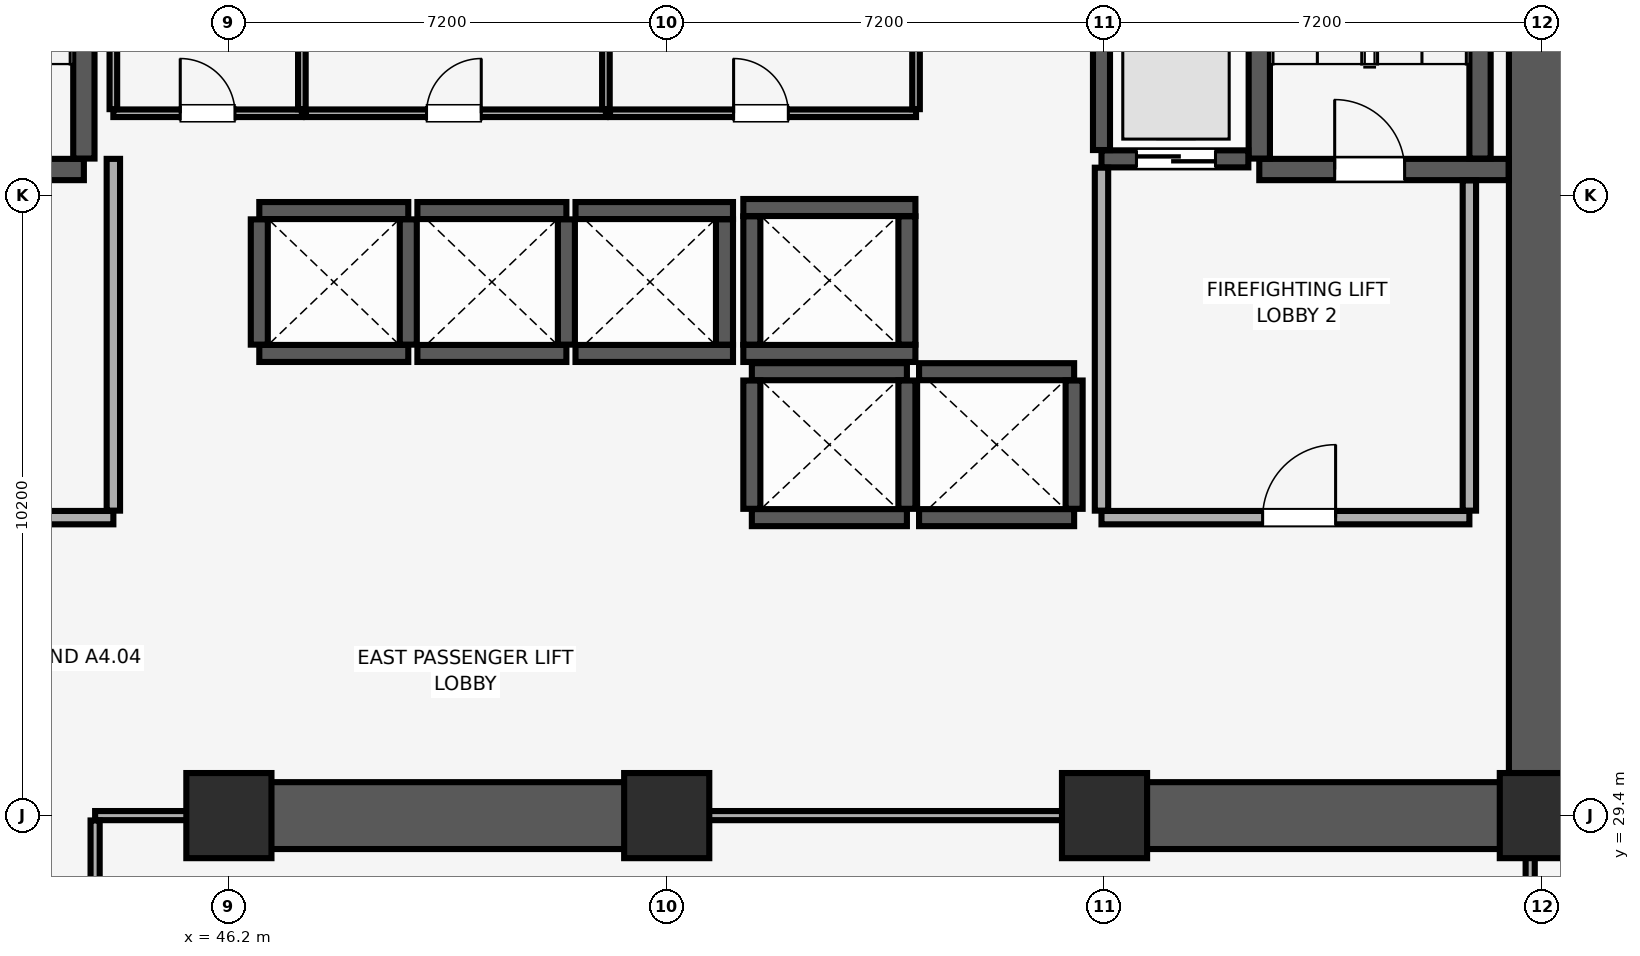
"""IFC4 building model, lengths in metres.
Left out: names, types, materials, properties, quantities, classifications, styles, units other than length and angle.
Written with IfcOpenShell. Run it as: python <this file> out.ifc"""

import sys

from ifc_helpers import new_model, si_unit, direction, frame, frame_2d, origin, origin_2d, place, context, subcontext, project, spatial, rectangle, extrude, element, fill, save


model = new_model("IFC4")
c1 = context("Model", 3, precision=1e-05, world=origin(), true_north=direction((0.0, 1.0)))
c2 = subcontext(c1, "Body", "Model", "MODEL_VIEW")
j1 = project(units=[si_unit("LENGTHUNIT", "METRE"), si_unit("PLANEANGLEUNIT", "RADIAN")], contexts=[c1])
p1 = place(None, origin())
s1 = spatial("IfcSite", under=j1, at=p1, CompositionType="ELEMENT")
p2 = place(p1, origin())
s2 = spatial("IfcBuilding", under=s1, at=p2, CompositionType="ELEMENT")
p3 = place(p2, frame((0.0, 0.0, 26.0)))
s3 = spatial("IfcBuildingStorey", under=s2, at=p3, CompositionType="ELEMENT", Elevation=26.0)
for number, where, z_axis, x_axis in (
    (1, (46.2, 29.4, 0.0), (0.0, 0.0, 1.0), (1.0, 0.0, 0.0)),
    (2, (53.4, 29.4, 0.0), (0.0, 0.0, 1.0), (1.0, 0.0, 0.0)),
    (3, (60.6, 29.4, 0.0), (0.0, 0.0, 1.0), (1.0, 0.0, 0.0)),
    (4, (67.8, 29.4, 0.0), (0.0, 0.0, 1.0), (1.0, 0.0, 0.0)),
):
    element("IfcColumn", number, at=place(p3, frame(where, z_axis=z_axis, x_axis=x_axis)), inside=s3, PredefinedType="COLUMN", context=c2, shape_type="SweptSolid", body=[
        extrude(rectangle(XDim=1.4, YDim=1.4, at=origin_2d()), origin(), (0.0, 0.0, 1.0), 5.16),
    ])
p4 = place(p3, frame((67.8, 29.4, 0.0), z_axis=(0.0, 0.0, 1.0), x_axis=(0.0, 1.0, 0.0)))
e5 = element("IfcWall", 5, at=p4, inside=s3, PredefinedType="SHEAR", context=c2, shape_type="SweptSolid", body=[
    extrude(rectangle(XDim=19.2, YDim=1.1, at=frame_2d((9.6, 0.0))), origin(), (0.0, 0.0, 1.0), 5.12),
])
p5 = place(p3, frame((46.0, 29.4, 0.0), z_axis=(0.0, 0.0, 1.0), x_axis=(1.0, 0.0, 0.0)))
e6 = element("IfcWall", 6, at=p5, inside=s3, PredefinedType="SHEAR", context=c2, shape_type="SweptSolid", body=[
    extrude(rectangle(XDim=7.6, YDim=1.1, at=frame_2d((3.8, 0.0))), origin(), (0.0, 0.0, 1.0), 5.12),
])
p6 = place(p3, frame((60.4, 29.4, 0.0), z_axis=(0.0, 0.0, 1.0), x_axis=(1.0, 0.0, 0.0)))
e7 = element("IfcWall", 7, at=p6, inside=s3, PredefinedType="SHEAR", context=c2, shape_type="SweptSolid", body=[
    extrude(rectangle(XDim=6.845, YDim=1.1, at=frame_2d((3.423, 0.0))), origin(), (0.0, 0.0, 1.0), 5.12),
])
p7 = place(p3, frame((40.185, 40.025, 0.0), z_axis=(0.0, 0.0, 1.0), x_axis=(1.0, 0.0, 0.0)))
e8 = element("IfcWall", 8, at=p7, inside=s3, PredefinedType="SHEAR", context=c2, shape_type="SweptSolid", body=[
    extrude(rectangle(XDim=3.63, YDim=0.35, at=frame_2d((1.815, 0.0))), origin(), (0.0, 0.0, 1.0), 5.12),
])
p8 = place(p7, frame((1.24, 0.0, 0.0)))
e9 = element("IfcOpeningElement", 9, at=p8, cuts=e8, PredefinedType="OPENING", context=c2, shape_type="SweptSolid", body=[
    extrude(rectangle(XDim=1.15, YDim=2.15, at=frame_2d((0.575, 1.075))), frame((0.0, 0.185, 0.0), z_axis=(0.0, -1.0, 0.0), x_axis=(1.0, 0.0, 0.0)), (0.0, 0.0, 1.0), 0.37),
])
p9 = place(p3, frame((43.815, 40.205, 0.0), z_axis=(0.0, 0.0, 1.0), x_axis=(0.0, 1.0, 0.0)))
e10 = element("IfcWall", 10, at=p9, inside=s3, PredefinedType="SHEAR", context=c2, shape_type="SweptSolid", body=[
    extrude(rectangle(XDim=8.09, YDim=0.35, at=frame_2d((4.045, 0.0))), origin(), (0.0, 0.0, 1.0), 5.12),
])
p10 = place(p3, frame((63.145, 40.025, 0.0), z_axis=(0.0, 0.0, 1.0), x_axis=(1.0, 0.0, 0.0)))
e11 = element("IfcWall", 11, at=p10, inside=s3, PredefinedType="SHEAR", context=c2, shape_type="SweptSolid", body=[
    extrude(rectangle(XDim=4.1, YDim=0.35, at=frame_2d((2.05, 0.0))), origin(), (0.0, 0.0, 1.0), 5.12),
])
p11 = place(p10, frame((1.24, 0.0, 0.0)))
e12 = element("IfcOpeningElement", 12, at=p11, cuts=e11, PredefinedType="OPENING", context=c2, shape_type="SweptSolid", body=[
    extrude(rectangle(XDim=1.15, YDim=2.15, at=frame_2d((0.575, 1.075))), frame((0.0, 0.185, 0.0), z_axis=(0.0, -1.0, 0.0), x_axis=(1.0, 0.0, 0.0)), (0.0, 0.0, 1.0), 0.37),
])
for number, where, z_axis, x_axis in (
    (13, (63.145, 40.205, 0.0), (0.0, 0.0, 1.0), (0.0, 1.0, 0.0)),
    (14, (66.775, 40.205, 0.0), (0.0, 0.0, 1.0), (0.0, 1.0, 0.0)),
):
    element("IfcWall", number, at=place(p3, frame(where, z_axis=z_axis, x_axis=x_axis)), inside=s3, PredefinedType="SHEAR", context=c2, shape_type="SweptSolid", body=[
        extrude(rectangle(XDim=8.09, YDim=0.35, at=frame_2d((4.045, 0.0))), origin(), (0.0, 0.0, 1.0), 5.12),
    ])
for number, where, z_axis, x_axis in (
    (15, (46.7, 37.0, 0.0), (0.0, 0.0, 1.0), (1.0, 0.0, 0.0)),
    (16, (46.7, 39.35, 0.0), (0.0, 0.0, 1.0), (1.0, 0.0, 0.0)),
):
    element("IfcWall", number, at=place(p3, frame(where, z_axis=z_axis, x_axis=x_axis)), inside=s3, PredefinedType="SHEAR", context=c2, shape_type="SweptSolid", body=[
        extrude(rectangle(XDim=2.45, YDim=0.28, at=frame_2d((1.225, 0.0))), origin(), (0.0, 0.0, 1.0), 5.12),
    ])
for number, where, z_axis, x_axis in (
    (17, (46.7, 37.145, 0.0), (0.0, 0.0, 1.0), (0.0, 1.0, 0.0)),
    (18, (49.15, 37.145, 0.0), (0.0, 0.0, 1.0), (0.0, 1.0, 0.0)),
):
    element("IfcWall", number, at=place(p3, frame(where, z_axis=z_axis, x_axis=x_axis)), inside=s3, PredefinedType="SHEAR", context=c2, shape_type="SweptSolid", body=[
        extrude(rectangle(XDim=2.06, YDim=0.28, at=frame_2d((1.03, 0.0))), origin(), (0.0, 0.0, 1.0), 5.12),
    ])
for number, where, z_axis, x_axis in (
    (19, (49.3, 37.0, 0.0), (0.0, 0.0, 1.0), (1.0, 0.0, 0.0)),
    (20, (49.3, 39.35, 0.0), (0.0, 0.0, 1.0), (1.0, 0.0, 0.0)),
):
    element("IfcWall", number, at=place(p3, frame(where, z_axis=z_axis, x_axis=x_axis)), inside=s3, PredefinedType="SHEAR", context=c2, shape_type="SweptSolid", body=[
        extrude(rectangle(XDim=2.45, YDim=0.28, at=frame_2d((1.225, 0.0))), origin(), (0.0, 0.0, 1.0), 5.12),
    ])
p12 = place(p3, frame((51.75, 37.145, 0.0), z_axis=(0.0, 0.0, 1.0), x_axis=(0.0, 1.0, 0.0)))
e21 = element("IfcWall", 21, at=p12, inside=s3, PredefinedType="SHEAR", context=c2, shape_type="SweptSolid", body=[
    extrude(rectangle(XDim=2.06, YDim=0.28, at=frame_2d((1.03, 0.0))), origin(), (0.0, 0.0, 1.0), 5.12),
])
for number, where, z_axis, x_axis in (
    (22, (51.9, 37.0, 0.0), (0.0, 0.0, 1.0), (1.0, 0.0, 0.0)),
    (23, (51.9, 39.35, 0.0), (0.0, 0.0, 1.0), (1.0, 0.0, 0.0)),
):
    element("IfcWall", number, at=place(p3, frame(where, z_axis=z_axis, x_axis=x_axis)), inside=s3, PredefinedType="SHEAR", context=c2, shape_type="SweptSolid", body=[
        extrude(rectangle(XDim=2.59, YDim=0.28, at=frame_2d((1.295, 0.0))), origin(), (0.0, 0.0, 1.0), 5.12),
    ])
p13 = place(p3, frame((54.35, 37.145, 0.0), z_axis=(0.0, 0.0, 1.0), x_axis=(0.0, 1.0, 0.0)))
e24 = element("IfcWall", 24, at=p13, inside=s3, PredefinedType="SHEAR", context=c2, shape_type="SweptSolid", body=[
    extrude(rectangle(XDim=2.06, YDim=0.28, at=frame_2d((1.03, 0.0))), origin(), (0.0, 0.0, 1.0), 5.12),
])
for number, where, z_axis, x_axis in (
    (25, (54.8, 34.3, 0.0), (0.0, 0.0, 1.0), (1.0, 0.0, 0.0)),
    (26, (54.8, 36.7, 0.0), (0.0, 0.0, 1.0), (1.0, 0.0, 0.0)),
):
    element("IfcWall", number, at=place(p3, frame(where, z_axis=z_axis, x_axis=x_axis)), inside=s3, PredefinedType="SHEAR", context=c2, shape_type="SweptSolid", body=[
        extrude(rectangle(XDim=2.55, YDim=0.28, at=frame_2d((1.275, 0.0))), origin(), (0.0, 0.0, 1.0), 5.12),
    ])
for number, where, z_axis, x_axis in (
    (27, (54.8, 34.445, 0.0), (0.0, 0.0, 1.0), (0.0, 1.0, 0.0)),
    (28, (57.35, 34.445, 0.0), (0.0, 0.0, 1.0), (0.0, 1.0, 0.0)),
):
    element("IfcWall", number, at=place(p3, frame(where, z_axis=z_axis, x_axis=x_axis)), inside=s3, PredefinedType="SHEAR", context=c2, shape_type="SweptSolid", body=[
        extrude(rectangle(XDim=2.11, YDim=0.28, at=frame_2d((1.055, 0.0))), origin(), (0.0, 0.0, 1.0), 5.12),
    ])
for number, where, z_axis, x_axis in (
    (29, (57.55, 34.3, 0.0), (0.0, 0.0, 1.0), (1.0, 0.0, 0.0)),
    (30, (57.55, 36.7, 0.0), (0.0, 0.0, 1.0), (1.0, 0.0, 0.0)),
):
    element("IfcWall", number, at=place(p3, frame(where, z_axis=z_axis, x_axis=x_axis)), inside=s3, PredefinedType="SHEAR", context=c2, shape_type="SweptSolid", body=[
        extrude(rectangle(XDim=2.55, YDim=0.28, at=frame_2d((1.275, 0.0))), origin(), (0.0, 0.0, 1.0), 5.12),
    ])
p14 = place(p3, frame((60.1, 34.445, 0.0), z_axis=(0.0, 0.0, 1.0), x_axis=(0.0, 1.0, 0.0)))
e31 = element("IfcWall", 31, at=p14, inside=s3, PredefinedType="SHEAR", context=c2, shape_type="SweptSolid", body=[
    extrude(rectangle(XDim=2.11, YDim=0.28, at=frame_2d((1.055, 0.0))), origin(), (0.0, 0.0, 1.0), 5.12),
])
for number, where, z_axis, x_axis in (
    (32, (54.66, 37.0, 0.0), (0.0, 0.0, 1.0), (1.0, 0.0, 0.0)),
    (33, (54.66, 39.4, 0.0), (0.0, 0.0, 1.0), (1.0, 0.0, 0.0)),
):
    element("IfcWall", number, at=place(p3, frame(where, z_axis=z_axis, x_axis=x_axis)), inside=s3, PredefinedType="SHEAR", context=c2, shape_type="SweptSolid", body=[
        extrude(rectangle(XDim=2.83, YDim=0.28, at=frame_2d((1.415, 0.0))), origin(), (0.0, 0.0, 1.0), 5.12),
    ])
for number, where, z_axis, x_axis in (
    (34, (54.8, 37.145, 0.0), (0.0, 0.0, 1.0), (0.0, 1.0, 0.0)),
    (35, (57.35, 37.145, 0.0), (0.0, 0.0, 1.0), (0.0, 1.0, 0.0)),
):
    element("IfcWall", number, at=place(p3, frame(where, z_axis=z_axis, x_axis=x_axis)), inside=s3, PredefinedType="SHEAR", context=c2, shape_type="SweptSolid", body=[
        extrude(rectangle(XDim=2.11, YDim=0.28, at=frame_2d((1.055, 0.0))), origin(), (0.0, 0.0, 1.0), 5.12),
    ])
p15 = place(p3, frame((60.55, 40.2, 0.0), z_axis=(0.0, 0.0, 1.0), x_axis=(1.0, 0.0, 0.0)))
e36 = element("IfcWall", 36, at=p15, inside=s3, PredefinedType="SHEAR", context=c2, shape_type="SweptSolid", body=[
    extrude(rectangle(XDim=2.415, YDim=0.28, at=frame_2d((1.208, 0.0))), origin(), (0.0, 0.0, 1.0), 5.12),
])
p16 = place(p15, frame((0.575, 0.0, 0.0)))
e37 = element("IfcOpeningElement", 37, at=p16, cuts=e36, PredefinedType="OPENING", context=c2, shape_type="SweptSolid", body=[
    extrude(rectangle(XDim=1.3, YDim=2.3, at=frame_2d((0.65, 1.15))), frame((0.0, 0.15, 0.0), z_axis=(0.0, -1.0, 0.0), x_axis=(1.0, 0.0, 0.0)), (0.0, 0.0, 1.0), 0.3),
])
p17 = place(p3, frame((60.55, 40.345, 0.0), z_axis=(0.0, 0.0, 1.0), x_axis=(0.0, 1.0, 0.0)))
e38 = element("IfcWall", 38, at=p17, inside=s3, PredefinedType="SHEAR", context=c2, shape_type="SweptSolid", body=[
    extrude(rectangle(XDim=2.81, YDim=0.28, at=frame_2d((1.405, 0.0))), origin(), (0.0, 0.0, 1.0), 5.12),
])
p18 = place(p3, frame((60.55, 34.3, 0.0), z_axis=(0.0, 0.0, 1.0), x_axis=(1.0, 0.0, 0.0)))
e39 = element("IfcWall", 39, at=p18, inside=s3, PredefinedType="PARTITIONING", context=c2, shape_type="SweptSolid", body=[
    extrude(rectangle(XDim=6.05, YDim=0.22, at=frame_2d((3.025, 0.0))), origin(), (0.0, 0.0, 1.0), 5.12),
])
p19 = place(p18, frame((2.65, 0.0, 0.0)))
e40 = element("IfcOpeningElement", 40, at=p19, cuts=e39, PredefinedType="OPENING", context=c2, shape_type="SweptSolid", body=[
    extrude(rectangle(XDim=1.2, YDim=2.15, at=frame_2d((0.6, 1.075))), frame((0.0, 0.12, 0.0), z_axis=(0.0, -1.0, 0.0), x_axis=(1.0, 0.0, 0.0)), (0.0, 0.0, 1.0), 0.24),
])
p20 = place(p3, frame((60.55, 34.415, 0.0), z_axis=(0.0, 0.0, 1.0), x_axis=(0.0, 1.0, 0.0)))
e41 = element("IfcWall", 41, at=p20, inside=s3, PredefinedType="PARTITIONING", context=c2, shape_type="SweptSolid", body=[
    extrude(rectangle(XDim=5.64, YDim=0.22, at=frame_2d((2.82, 0.0))), origin(), (0.0, 0.0, 1.0), 5.12),
])
p21 = place(p3, frame((66.6, 34.415, 0.0), z_axis=(0.0, 0.0, 1.0), x_axis=(0.0, 1.0, 0.0)))
e42 = element("IfcWall", 42, at=p21, inside=s3, PredefinedType="PARTITIONING", context=c2, shape_type="SweptSolid", body=[
    extrude(rectangle(XDim=5.43, YDim=0.22, at=frame_2d((2.715, 0.0))), origin(), (0.0, 0.0, 1.0), 5.12),
])
p22 = place(p3, frame((39.7, 34.3, 0.0), z_axis=(0.0, 0.0, 1.0), x_axis=(1.0, 0.0, 0.0)))
e43 = element("IfcWall", 43, at=p22, inside=s3, PredefinedType="PARTITIONING", context=c2, shape_type="SweptSolid", body=[
    extrude(rectangle(XDim=4.6, YDim=0.22, at=frame_2d((2.3, 0.0))), origin(), (0.0, 0.0, 1.0), 5.12),
])
p23 = place(p22, frame((1.7, 0.0, 0.0)))
e44 = element("IfcOpeningElement", 44, at=p23, cuts=e43, PredefinedType="OPENING", context=c2, shape_type="SweptSolid", body=[
    extrude(rectangle(XDim=1.2, YDim=2.15, at=frame_2d((0.6, 1.075))), frame((0.0, 0.12, 0.0), z_axis=(0.0, -1.0, 0.0), x_axis=(1.0, 0.0, 0.0)), (0.0, 0.0, 1.0), 0.24),
])
p24 = place(p3, frame((44.3, 34.415, 0.0), z_axis=(0.0, 0.0, 1.0), x_axis=(0.0, 1.0, 0.0)))
e45 = element("IfcWall", 45, at=p24, inside=s3, PredefinedType="PARTITIONING", context=c2, shape_type="SweptSolid", body=[
    extrude(rectangle(XDim=5.785, YDim=0.22, at=frame_2d((2.893, 0.0))), origin(), (0.0, 0.0, 1.0), 5.12),
])
p25 = place(p3, frame((44.3, 40.95, 0.0), z_axis=(0.0, 0.0, 1.0), x_axis=(1.0, 0.0, 0.0)))
e46 = element("IfcWall", 46, at=p25, inside=s3, PredefinedType="PARTITIONING", context=c2, shape_type="SweptSolid", body=[
    extrude(rectangle(XDim=3.1, YDim=0.125, at=frame_2d((1.55, 0.0))), origin(), (0.0, 0.0, 1.0), 5.12),
])
p26 = place(p25, frame((1.1, 0.0, 0.0)))
e47 = element("IfcOpeningElement", 47, at=p26, cuts=e46, PredefinedType="OPENING", context=c2, shape_type="SweptSolid", body=[
    extrude(rectangle(XDim=0.9, YDim=2.1, at=frame_2d((0.45, 1.05))), frame((0.0, 0.073, 0.0), z_axis=(0.0, -1.0, 0.0), x_axis=(1.0, 0.0, 0.0)), (0.0, 0.0, 1.0), 0.145),
])
for number, where, z_axis, x_axis in (
    (48, (44.3, 41.018, 0.0), (0.0, 0.0, 1.0), (0.0, 1.0, 0.0)),
    (49, (47.4, 41.018, 0.0), (0.0, 0.0, 1.0), (0.0, 1.0, 0.0)),
):
    element("IfcWall", number, at=place(p3, frame(where, z_axis=z_axis, x_axis=x_axis)), inside=s3, PredefinedType="PARTITIONING", context=c2, shape_type="SweptSolid", body=[
        extrude(rectangle(XDim=7.215, YDim=0.125, at=frame_2d((3.607, 0.0))), origin(), (0.0, 0.0, 1.0), 5.12),
    ])
p27 = place(p3, frame((47.468, 40.95, 0.0), z_axis=(0.0, 0.0, 1.0), x_axis=(1.0, 0.0, 0.0)))
e50 = element("IfcWall", 50, at=p27, inside=s3, PredefinedType="PARTITIONING", context=c2, shape_type="SweptSolid", body=[
    extrude(rectangle(XDim=4.932, YDim=0.125, at=frame_2d((2.466, 0.0))), origin(), (0.0, 0.0, 1.0), 5.12),
])
p28 = place(p27, frame((1.982, 0.0, 0.0)))
e51 = element("IfcOpeningElement", 51, at=p28, cuts=e50, PredefinedType="OPENING", context=c2, shape_type="SweptSolid", body=[
    extrude(rectangle(XDim=0.9, YDim=2.1, at=frame_2d((0.45, 1.05))), frame((0.0, 0.073, 0.0), z_axis=(0.0, -1.0, 0.0), x_axis=(1.0, 0.0, 0.0)), (0.0, 0.0, 1.0), 0.145),
])
p29 = place(p3, frame((52.4, 41.018, 0.0), z_axis=(0.0, 0.0, 1.0), x_axis=(0.0, 1.0, 0.0)))
e52 = element("IfcWall", 52, at=p29, inside=s3, PredefinedType="PARTITIONING", context=c2, shape_type="SweptSolid", body=[
    extrude(rectangle(XDim=7.215, YDim=0.125, at=frame_2d((3.607, 0.0))), origin(), (0.0, 0.0, 1.0), 5.12),
])
p30 = place(p3, frame((52.468, 40.95, 0.0), z_axis=(0.0, 0.0, 1.0), x_axis=(1.0, 0.0, 0.0)))
e53 = element("IfcWall", 53, at=p30, inside=s3, PredefinedType="PARTITIONING", context=c2, shape_type="SweptSolid", body=[
    extrude(rectangle(XDim=5.032, YDim=0.125, at=frame_2d((2.516, 0.0))), origin(), (0.0, 0.0, 1.0), 5.12),
])
p31 = place(p30, frame((2.032, 0.0, 0.0)))
e54 = element("IfcOpeningElement", 54, at=p31, cuts=e53, PredefinedType="OPENING", context=c2, shape_type="SweptSolid", body=[
    extrude(rectangle(XDim=0.9, YDim=2.1, at=frame_2d((0.45, 1.05))), frame((0.0, 0.073, 0.0), z_axis=(0.0, -1.0, 0.0), x_axis=(1.0, 0.0, 0.0)), (0.0, 0.0, 1.0), 0.145),
])
p32 = place(p3, frame((57.5, 41.018, 0.0), z_axis=(0.0, 0.0, 1.0), x_axis=(0.0, 1.0, 0.0)))
e55 = element("IfcWall", 55, at=p32, inside=s3, PredefinedType="PARTITIONING", context=c2, shape_type="SweptSolid", body=[
    extrude(rectangle(XDim=2.167, YDim=0.125, at=frame_2d((1.084, 0.0))), origin(), (0.0, 0.0, 1.0), 5.12),
])
p33 = place(p3, frame((44.0, 29.4, 0.0), z_axis=(0.0, 0.0, 1.0), x_axis=(1.0, 0.0, 0.0)))
e56 = element("IfcWall", 56, at=p33, inside=s3, PredefinedType="PARTITIONING", context=c2, shape_type="SweptSolid", body=[
    extrude(rectangle(XDim=1.99, YDim=0.15, at=frame_2d((0.995, 0.0))), origin(), (0.0, 0.0, 1.0), 4.06),
])
p34 = place(p3, frame((53.61, 29.4, 0.0), z_axis=(0.0, 0.0, 1.0), x_axis=(1.0, 0.0, 0.0)))
e57 = element("IfcWall", 57, at=p34, inside=s3, PredefinedType="PARTITIONING", context=c2, shape_type="SweptSolid", body=[
    extrude(rectangle(XDim=6.78, YDim=0.15, at=frame_2d((3.39, 0.0))), origin(), (0.0, 0.0, 1.0), 4.06),
])
p35 = place(p3, frame((44.0, 23.88, 0.0), z_axis=(0.0, 0.0, 1.0), x_axis=(0.0, 1.0, 0.0)))
e58 = element("IfcWall", 58, at=p35, inside=s3, PredefinedType="PARTITIONING", context=c2, shape_type="SweptSolid", body=[
    extrude(rectangle(XDim=5.44, YDim=0.15, at=frame_2d((2.72, 0.0))), origin(), (0.0, 0.0, 1.0), 5.12),
])
p36 = place(p3, frame((67.6, 23.88, 0.0), z_axis=(0.0, 0.0, 1.0), x_axis=(0.0, 1.0, 0.0)))
e59 = element("IfcWall", 59, at=p36, inside=s3, PredefinedType="PARTITIONING", context=c2, shape_type="SweptSolid", body=[
    extrude(rectangle(XDim=5.51, YDim=0.15, at=frame_2d((2.755, 0.0))), origin(), (0.0, 0.0, 1.0), 4.627),
])
p37 = place(p11, origin())
e60 = element("IfcDoor", 60, at=p37, inside=s3, OperationType="SINGLE_SWING_LEFT", PredefinedType="DOOR", context=c2, shape_type="SweptSolid", body=[
    extrude(rectangle(XDim=1.15, YDim=2.15, at=frame_2d((0.575, 1.075))), frame((0.0, 0.025, 0.0), z_axis=(0.0, -1.0, 0.0), x_axis=(1.0, 0.0, 0.0)), (0.0, 0.0, 1.0), 0.05),
])
fill(e12, e60)
p38 = place(p16, origin())
e61 = element("IfcDoor", 61, at=p38, inside=s3, OperationType="DOUBLE_DOOR_SLIDING", PredefinedType="DOOR", context=c2, shape_type="SweptSolid", body=[
    extrude(rectangle(XDim=1.3, YDim=2.3, at=frame_2d((0.65, 1.15))), frame((0.0, 0.025, 0.0), z_axis=(0.0, -1.0, 0.0), x_axis=(1.0, 0.0, 0.0)), (0.0, 0.0, 1.0), 0.05),
])
fill(e37, e61)
p39 = place(p19, origin())
e62 = element("IfcDoor", 62, at=p39, inside=s3, OperationType="SINGLE_SWING_RIGHT", PredefinedType="DOOR", context=c2, shape_type="SweptSolid", body=[
    extrude(rectangle(XDim=1.2, YDim=2.15, at=frame_2d((0.6, 1.075))), frame((0.0, 0.025, 0.0), z_axis=(0.0, -1.0, 0.0), x_axis=(1.0, 0.0, 0.0)), (0.0, 0.0, 1.0), 0.05),
])
fill(e40, e62)
p40 = place(p26, origin())
e63 = element("IfcDoor", 63, at=p40, inside=s3, OperationType="SINGLE_SWING_LEFT", PredefinedType="DOOR", context=c2, shape_type="SweptSolid", body=[
    extrude(rectangle(XDim=0.9, YDim=2.1, at=frame_2d((0.45, 1.05))), frame((0.0, 0.025, 0.0), z_axis=(0.0, -1.0, 0.0), x_axis=(1.0, 0.0, 0.0)), (0.0, 0.0, 1.0), 0.05),
])
fill(e47, e63)
p41 = place(p28, origin())
e64 = element("IfcDoor", 64, at=p41, inside=s3, OperationType="SINGLE_SWING_RIGHT", PredefinedType="DOOR", context=c2, shape_type="SweptSolid", body=[
    extrude(rectangle(XDim=0.9, YDim=2.1, at=frame_2d((0.45, 1.05))), frame((0.0, 0.025, 0.0), z_axis=(0.0, -1.0, 0.0), x_axis=(1.0, 0.0, 0.0)), (0.0, 0.0, 1.0), 0.05),
])
fill(e51, e64)
p42 = place(p31, origin())
e65 = element("IfcDoor", 65, at=p42, inside=s3, OperationType="SINGLE_SWING_LEFT", PredefinedType="DOOR", context=c2, shape_type="SweptSolid", body=[
    extrude(rectangle(XDim=0.9, YDim=2.1, at=frame_2d((0.45, 1.05))), frame((0.0, 0.025, 0.0), z_axis=(0.0, -1.0, 0.0), x_axis=(1.0, 0.0, 0.0)), (0.0, 0.0, 1.0), 0.05),
])
fill(e54, e65)
save(model, sys.argv[1])
